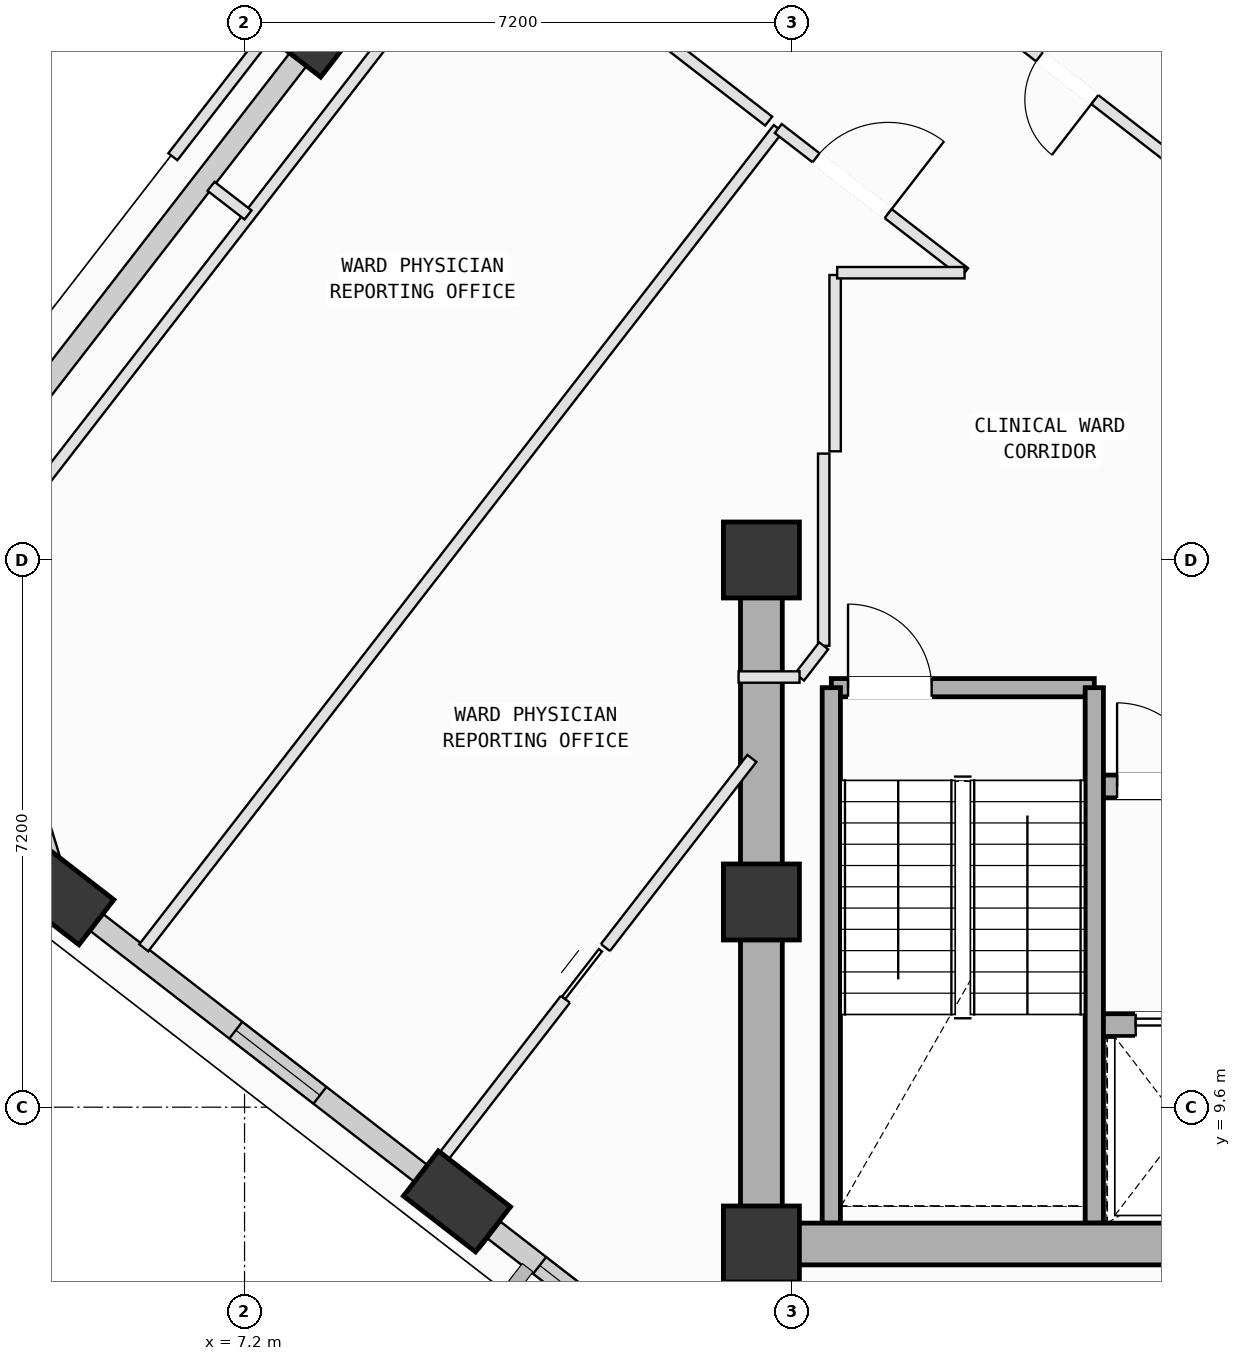
"""IFC4 building model, lengths in metres.
Left out: names, types, materials, properties, quantities, classifications, styles, units other than length and angle.
Written with IfcOpenShell. Run it as: python <this file> out.ifc"""

import sys

from ifc_helpers import new_model, si_unit, direction, frame, frame_2d, origin, origin_2d, place, context, subcontext, project, spatial, rectangle, extrude, element, fill, save


model = new_model("IFC4")
c1 = context("Model", 3, precision=1e-05, world=origin(), true_north=direction((0.0, 1.0)))
c2 = subcontext(c1, "Body", "Model", "MODEL_VIEW")
j1 = project(units=[si_unit("LENGTHUNIT", "METRE"), si_unit("PLANEANGLEUNIT", "RADIAN")], contexts=[c1])
p1 = place(None, origin())
s1 = spatial("IfcSite", under=j1, at=p1, CompositionType="ELEMENT")
p2 = place(p1, origin())
s2 = spatial("IfcBuilding", under=s1, at=p2, CompositionType="ELEMENT")
p3 = place(p2, frame((0.0, 0.0, 247.2)))
s3 = spatial("IfcBuildingStorey", under=s2, at=p3, CompositionType="ELEMENT", Elevation=247.2)
for number, where, z_axis, x_axis in (
    (1, (14.0, 7.8, 0.0), (0.0, 0.0, 1.0), (1.0, 0.0, 0.0)),
    (2, (14.0, 12.3, 0.0), (0.0, 0.0, 1.0), (1.0, 0.0, 0.0)),
    (3, (14.0, 16.8, 0.0), (0.0, 0.0, 1.0), (1.0, 0.0, 0.0)),
):
    element("IfcColumn", number, at=place(p3, frame(where, z_axis=z_axis, x_axis=x_axis)), inside=s3, PredefinedType="COLUMN", context=c2, shape_type="SweptSolid", body=[
        extrude(rectangle(XDim=1.0, YDim=1.0, at=origin_2d()), origin(), (0.0, 0.0, 1.0), 4.0),
    ])
p4 = place(p3, frame((8.272, 23.859, 0.002), z_axis=(0.00479977683, -0.104379956889, 0.994525910543), x_axis=(0.575449404971, 0.813653503986, 0.082619354686)))
e4 = element("IfcColumn", 4, at=p4, inside=s3, PredefinedType="COLUMN", context=c2, shape_type="SweptSolid", body=[
    extrude(rectangle(XDim=1.2, YDim=0.75, at=origin_2d()), origin(), (0.0, 0.0, 1.0), 4.018),
])
p5 = place(p3, frame((4.776, 12.401, 0.002), z_axis=(0.051917734031, -0.11807195289, 0.991646894229), x_axis=(-0.96817687498, 0.237482706263, 0.078965201073)))
e5 = element("IfcColumn", 5, at=p5, inside=s3, PredefinedType="COLUMN", context=c2, shape_type="SweptSolid", body=[
    extrude(rectangle(XDim=1.2, YDim=0.75, at=origin_2d()), origin(), (0.0, 0.0, 1.0), 4.03),
])
p6 = place(p3, frame((9.995, 8.36, 0.002), z_axis=(0.068486749732, -0.096572989879, 0.992966878973), x_axis=(-0.996627035573, 0.038482771556, 0.072481916762)))
e6 = element("IfcColumn", 6, at=p6, inside=s3, PredefinedType="COLUMN", context=c2, shape_type="SweptSolid", body=[
    extrude(rectangle(XDim=1.2, YDim=0.75, at=origin_2d()), origin(), (0.0, 0.0, 1.0), 4.025),
])
p7 = place(p3, frame((3.364, 17.519, 0.0), z_axis=(0.0, 0.0, 1.0), x_axis=(0.612209375749, 0.790695693832, 0.0)))
e7 = element("IfcWall", 7, at=p7, inside=s3, PredefinedType="SOLIDWALL", context=c2, shape_type="SweptSolid", body=[
    extrude(rectangle(XDim=7.485, YDim=0.28, at=frame_2d((3.742, 0.0))), origin(), (0.0, 0.0, 1.0), 3.265),
])
p8 = place(p3, frame((4.736, 12.533, 0.0), z_axis=(0.0, 0.0, 1.0), x_axis=(-0.29287135158, 0.956151855839, 0.0)))
e8 = element("IfcWall", 8, at=p8, inside=s3, PredefinedType="SOLIDWALL", context=c2, shape_type="SweptSolid", body=[
    extrude(rectangle(XDim=4.408, YDim=0.28, at=frame_2d((2.204, 0.0))), origin(), (0.0, 0.0, 1.0), 3.265),
])
p9 = place(p3, frame((9.865, 8.461, 0.0), z_axis=(0.0, 0.0, 1.0), x_axis=(-0.790689704837, 0.612217110725, 0.0)))
e9 = element("IfcWall", 9, at=p9, inside=s3, PredefinedType="SOLIDWALL", context=c2, shape_type="SweptSolid", body=[
    extrude(rectangle(XDim=5.83, YDim=0.28, at=frame_2d((2.915, 0.0))), origin(), (0.0, 0.0, 1.0), 3.265),
])
p10 = place(p9, frame((2.117, 0.0, 0.75)))
e10 = element("IfcOpeningElement", 10, at=p10, cuts=e9, PredefinedType="OPENING", context=c2, shape_type="SweptSolid", body=[
    extrude(rectangle(XDim=1.4, YDim=1.85, at=frame_2d((0.7, 0.925))), frame((0.0, 0.15, 0.0), z_axis=(0.0, -1.0, 0.0), x_axis=(1.0, 0.0, 0.0)), (0.0, 0.0, 1.0), 0.3),
])
p11 = place(p3, frame((15.119, 4.393, 0.0), z_axis=(0.0, 0.0, 1.0), x_axis=(-0.790702891909, 0.612200079, 0.0)))
e11 = element("IfcWall", 11, at=p11, inside=s3, PredefinedType="SOLIDWALL", context=c2, shape_type="SweptSolid", body=[
    extrude(rectangle(XDim=5.861, YDim=0.28, at=frame_2d((2.93, 0.0))), origin(), (0.0, 0.0, 1.0), 3.265),
])
p12 = place(p11, frame((3.304, 0.0, 0.75)))
e12 = element("IfcOpeningElement", 12, at=p12, cuts=e11, PredefinedType="OPENING", context=c2, shape_type="SweptSolid", body=[
    extrude(rectangle(XDim=1.8, YDim=2.05, at=frame_2d((0.9, 1.025))), frame((0.0, 0.15, 0.0), z_axis=(0.0, -1.0, 0.0), x_axis=(1.0, 0.0, 0.0)), (0.0, 0.0, 1.0), 0.3),
])
p13 = place(p3, frame((14.92, 15.12, 0.0), z_axis=(0.0, 0.0, 1.0), x_axis=(1.0, 0.0, 0.0)))
e13 = element("IfcWall", 13, at=p13, inside=s3, PredefinedType="SOLIDWALL", context=c2, shape_type="SweptSolid", body=[
    extrude(rectangle(XDim=3.46, YDim=0.24, at=frame_2d((1.73, 0.0))), origin(), (0.0, 0.0, 1.0), 3.78),
])
p14 = place(p13, frame((0.22, 0.0, 0.0)))
e14 = element("IfcOpeningElement", 14, at=p14, cuts=e13, PredefinedType="OPENING", context=c2, shape_type="SweptSolid", body=[
    extrude(rectangle(XDim=1.1, YDim=2.15, at=frame_2d((0.55, 1.075))), frame((0.0, 0.13, 0.0), z_axis=(0.0, -1.0, 0.0), x_axis=(1.0, 0.0, 0.0)), (0.0, 0.0, 1.0), 0.26),
])
for number, where, z_axis, x_axis in (
    (15, (18.38, 15.12, 0.0), (0.0, 0.0, 1.0), (0.0, -1.0, 0.0)),
    (16, (14.92, 8.075, 0.0), (0.0, 0.0, 1.0), (0.0, 1.0, 0.0)),
):
    element("IfcWall", number, at=place(p3, frame(where, z_axis=z_axis, x_axis=x_axis)), inside=s3, PredefinedType="SOLIDWALL", context=c2, shape_type="SweptSolid", body=[
        extrude(rectangle(XDim=7.045, YDim=0.24, at=frame_2d((3.522, 0.0))), origin(), (0.0, 0.0, 1.0), 3.78),
    ])
p15 = place(p3, frame((14.0, 7.8, 0.0), z_axis=(0.0, 0.0, 1.0), x_axis=(1.0, 0.0, 0.0)))
e17 = element("IfcWall", 17, at=p15, inside=s3, PredefinedType="SHEAR", context=c2, shape_type="SweptSolid", body=[
    extrude(rectangle(XDim=10.8, YDim=0.55, at=frame_2d((5.4, 0.0))), origin(), (0.0, 0.0, 1.0), 3.78),
])
p16 = place(p3, frame((14.0, 16.8, 0.0), z_axis=(0.0, 0.0, 1.0), x_axis=(0.0, -1.0, 0.0)))
e18 = element("IfcWall", 18, at=p16, inside=s3, PredefinedType="SHEAR", context=c2, shape_type="SweptSolid", body=[
    extrude(rectangle(XDim=9.0, YDim=0.55, at=frame_2d((4.5, 0.0))), origin(), (0.0, 0.0, 1.0), 3.78),
])
p17 = place(p3, frame((18.5, 10.68, 0.0), z_axis=(0.0, 0.0, 1.0), x_axis=(1.0, 0.0, 0.0)))
e19 = element("IfcWall", 19, at=p17, inside=s3, PredefinedType="SOLIDWALL", context=c2, shape_type="SweptSolid", body=[
    extrude(rectangle(XDim=5.3, YDim=0.3, at=frame_2d((2.65, 0.0))), origin(), (0.0, 0.0, 1.0), 3.78),
])
p18 = place(p17, frame((4.22, 0.0, 0.0)))
e20 = element("IfcOpeningElement", 20, at=p18, cuts=e19, PredefinedType="OPENING", context=c2, shape_type="SweptSolid", body=[
    extrude(rectangle(XDim=0.86, YDim=2.06, at=frame_2d((0.43, 1.03))), frame((0.0, 0.16, 0.0), z_axis=(0.0, -1.0, 0.0), x_axis=(1.0, 0.0, 0.0)), (0.0, 0.0, 1.0), 0.32),
])
p19 = place(p17, frame((0.425, 0.0, 0.0)))
e21 = element("IfcOpeningElement", 21, at=p19, cuts=e19, PredefinedType="OPENING", context=c2, shape_type="SweptSolid", body=[
    extrude(rectangle(XDim=1.25, YDim=2.18, at=frame_2d((0.625, 1.09))), frame((0.0, 0.16, 0.0), z_axis=(0.0, -1.0, 0.0), x_axis=(1.0, 0.0, 0.0)), (0.0, 0.0, 1.0), 0.32),
])
p20 = place(p17, frame((2.525, 0.0, 0.0)))
e22 = element("IfcOpeningElement", 22, at=p20, cuts=e19, PredefinedType="OPENING", context=c2, shape_type="SweptSolid", body=[
    extrude(rectangle(XDim=1.25, YDim=2.18, at=frame_2d((0.625, 1.09))), frame((0.0, 0.16, 0.0), z_axis=(0.0, -1.0, 0.0), x_axis=(1.0, 0.0, 0.0)), (0.0, 0.0, 1.0), 0.32),
])
p21 = place(p3, frame((18.5, 13.82, 0.0), z_axis=(0.0, 0.0, 1.0), x_axis=(1.0, 0.0, 0.0)))
e23 = element("IfcWall", 23, at=p21, inside=s3, PredefinedType="SOLIDWALL", context=c2, shape_type="SweptSolid", body=[
    extrude(rectangle(XDim=5.3, YDim=0.3, at=frame_2d((2.65, 0.0))), origin(), (0.0, 0.0, 1.0), 3.78),
])
p22 = place(p21, frame((0.18, 0.0, 0.0)))
e24 = element("IfcOpeningElement", 24, at=p22, cuts=e23, PredefinedType="OPENING", context=c2, shape_type="SweptSolid", body=[
    extrude(rectangle(XDim=1.1, YDim=2.15, at=frame_2d((0.55, 1.075))), frame((0.0, 0.16, 0.0), z_axis=(0.0, -1.0, 0.0), x_axis=(1.0, 0.0, 0.0)), (0.0, 0.0, 1.0), 0.32),
])
p23 = place(p3, frame((18.467, 4.438, 0.0), z_axis=(0.0, 0.0, 1.0), x_axis=(0.612067264166, 0.79080570568, 0.0)))
e25 = element("IfcWall", 25, at=p23, inside=s3, PredefinedType="PARTITIONING", context=c2, shape_type="SweptSolid", body=[
    extrude(rectangle(XDim=4.091, YDim=0.15, at=frame_2d((2.045, 0.0))), origin(), (0.0, 0.0, 1.0), 3.78),
])
p24 = place(p3, frame((20.465, 7.673, 0.0), z_axis=(0.0, 0.0, 1.0), x_axis=(-0.612173192991, -0.790723707614, 0.0)))
e26 = element("IfcWall", 26, at=p24, inside=s3, PredefinedType="PARTITIONING", context=c2, shape_type="SweptSolid", body=[
    extrude(rectangle(XDim=3.876, YDim=0.15, at=frame_2d((1.938, 0.0))), origin(), (0.0, 0.0, 1.0), 3.78),
])
p25 = place(p3, frame((10.344, 7.8, 0.0), z_axis=(0.0, 0.0, 1.0), x_axis=(-0.790811380368, 0.612059932261, 0.0)))
e27 = element("IfcWall", 27, at=p25, inside=s3, PredefinedType="PARTITIONING", context=c2, shape_type="SweptSolid", body=[
    extrude(rectangle(XDim=0.783, YDim=0.15, at=frame_2d((0.391, 0.0))), origin(), (0.0, 0.0, 1.0), 3.265),
])
p26 = place(p3, frame((9.67, 8.758, 0.0), z_axis=(0.0, 0.0, 1.0), x_axis=(0.612219073781, 0.790688184874, 0.0)))
e28 = element("IfcWall", 28, at=p26, inside=s3, PredefinedType="PARTITIONING", context=c2, shape_type="SweptSolid", body=[
    extrude(rectangle(XDim=6.869, YDim=0.15, at=frame_2d((3.434, 0.0))), origin(), (0.0, 0.0, 1.0), 3.78),
])
p27 = place(p26, frame((2.861, 0.0, 0.0)))
e29 = element("IfcOpeningElement", 29, at=p27, cuts=e28, PredefinedType="OPENING", context=c2, shape_type="SweptSolid", body=[
    extrude(rectangle(XDim=0.86, YDim=2.06, at=frame_2d((0.43, 1.03))), frame((0.0, 0.085, 0.0), z_axis=(0.0, -1.0, 0.0), x_axis=(1.0, 0.0, 0.0)), (0.0, 0.0, 1.0), 0.17),
])
p28 = place(p3, frame((14.97, 20.55, 0.0), z_axis=(0.0, 0.0, 1.0), x_axis=(0.0, -1.0, 0.0)))
e30 = element("IfcWall", 30, at=p28, inside=s3, PredefinedType="PARTITIONING", context=c2, shape_type="SweptSolid", body=[
    extrude(rectangle(XDim=2.32, YDim=0.15, at=frame_2d((1.16, 0.0))), origin(), (0.0, 0.0, 1.0), 3.78),
])
p29 = place(p3, frame((14.82, 18.2, 0.0), z_axis=(0.0, 0.0, 1.0), x_axis=(0.0, -1.0, 0.0)))
e31 = element("IfcWall", 31, at=p29, inside=s3, PredefinedType="PARTITIONING", context=c2, shape_type="SweptSolid", body=[
    extrude(rectangle(XDim=2.529, YDim=0.15, at=frame_2d((1.265, 0.0))), origin(), (0.0, 0.0, 1.0), 3.78),
])
p30 = place(p3, frame((14.82, 15.671, 0.0), z_axis=(0.0, 0.0, 1.0), x_axis=(-0.612182668934, -0.790716371309, 0.0)))
e32 = element("IfcWall", 32, at=p30, inside=s3, PredefinedType="PARTITIONING", context=c2, shape_type="SweptSolid", body=[
    extrude(rectangle(XDim=0.52, YDim=0.15, at=frame_2d((0.26, 0.0))), origin(), (0.0, 0.0, 1.0), 3.78),
])
p31 = place(p3, frame((14.502, 15.26, 0.0), z_axis=(0.0, 0.0, 1.0), x_axis=(-1.0, 0.0, 0.0)))
e33 = element("IfcWall", 33, at=p31, inside=s3, PredefinedType="PARTITIONING", context=c2, shape_type="SweptSolid", body=[
    extrude(rectangle(XDim=0.802, YDim=0.15, at=frame_2d((0.401, 0.0))), origin(), (0.0, 0.0, 1.0), 3.78),
])
p32 = place(p3, frame((5.874, 11.697, 0.0), z_axis=(0.0, 0.0, 1.0), x_axis=(0.612268172049, 0.790650166316, 0.0)))
e34 = element("IfcWall", 34, at=p32, inside=s3, PredefinedType="PARTITIONING", context=c2, shape_type="SweptSolid", body=[
    extrude(rectangle(XDim=13.634, YDim=0.15, at=frame_2d((6.817, 0.0))), origin(), (0.0, 0.0, 1.0), 3.78),
])
p33 = place(p3, frame((14.222, 22.477, 0.0), z_axis=(0.0, 0.0, 1.0), x_axis=(0.790834390633, -0.612030200719, 0.0)))
e35 = element("IfcWall", 35, at=p33, inside=s3, PredefinedType="PARTITIONING", context=c2, shape_type="SweptSolid", body=[
    extrude(rectangle(XDim=3.099, YDim=0.15, at=frame_2d((1.55, 0.0))), origin(), (0.0, 0.0, 1.0), 3.78),
])
p34 = place(p33, frame((0.628, 0.0, 0.0)))
e36 = element("IfcOpeningElement", 36, at=p34, cuts=e35, PredefinedType="OPENING", context=c2, shape_type="SweptSolid", body=[
    extrude(rectangle(XDim=1.2, YDim=2.15, at=frame_2d((0.6, 1.075))), frame((0.0, 0.085, 0.0), z_axis=(0.0, -1.0, 0.0), x_axis=(1.0, 0.0, 0.0)), (0.0, 0.0, 1.0), 0.17),
])
p35 = place(p3, frame((16.673, 20.58, 0.0), z_axis=(0.0, 0.0, 1.0), x_axis=(-1.0, 0.0, 0.0)))
e37 = element("IfcWall", 37, at=p35, inside=s3, PredefinedType="PARTITIONING", context=c2, shape_type="SweptSolid", body=[
    extrude(rectangle(XDim=1.676, YDim=0.15, at=frame_2d((0.838, 0.0))), origin(), (0.0, 0.0, 1.0), 3.78),
])
p36 = place(p3, frame((3.608, 16.608, 0.0), z_axis=(0.0, 0.0, 1.0), x_axis=(0.612168330421, 0.790727472161, 0.0)))
e38 = element("IfcWall", 38, at=p36, inside=s3, PredefinedType="PARTITIONING", context=c2, shape_type="SweptSolid", body=[
    extrude(rectangle(XDim=11.139, YDim=0.15, at=frame_2d((5.57, 0.0))), origin(), (0.0, 0.0, 1.0), 3.265),
])
p37 = place(p3, frame((10.427, 25.416, 0.0), z_axis=(0.0, 0.0, 1.0), x_axis=(0.790662088337, -0.612252776283, 0.0)))
e39 = element("IfcWall", 39, at=p37, inside=s3, PredefinedType="PARTITIONING", context=c2, shape_type="SweptSolid", body=[
    extrude(rectangle(XDim=4.64, YDim=0.15, at=frame_2d((2.32, 0.0))), origin(), (0.0, 0.0, 1.0), 3.415),
])
p38 = place(p37, frame((1.72, 0.0, 0.0)))
e40 = element("IfcOpeningElement", 40, at=p38, cuts=e39, PredefinedType="OPENING", context=c2, shape_type="SweptSolid", body=[
    extrude(rectangle(XDim=1.2, YDim=2.15, at=frame_2d((0.6, 1.075))), frame((0.0, 0.085, 0.0), z_axis=(0.0, -1.0, 0.0), x_axis=(1.0, 0.0, 0.0)), (0.0, 0.0, 1.0), 0.17),
])
p39 = place(p3, frame((5.115, 11.848, 0.0), z_axis=(0.0, 0.0, 1.0), x_axis=(-0.790764891101, 0.612119993958, 0.0)))
e41 = element("IfcWall", 41, at=p39, inside=s3, PredefinedType="PARTITIONING", context=c2, shape_type="SweptSolid", body=[
    extrude(rectangle(XDim=2.407, YDim=0.15, at=frame_2d((1.203, 0.0))), origin(), (0.0, 0.0, 1.0), 3.265),
])
p40 = place(p3, frame((20.189, 21.462, 0.0), z_axis=(0.0, 0.0, 1.0), x_axis=(-0.790688923612, 0.612218119691, 0.0)))
e42 = element("IfcWall", 42, at=p40, inside=s3, PredefinedType="PARTITIONING", context=c2, shape_type="SweptSolid", body=[
    extrude(rectangle(XDim=5.48, YDim=0.15, at=frame_2d((2.74, 0.0))), origin(), (0.0, 0.0, 1.0), 3.415),
])
p41 = place(p40, frame((2.28, 0.0, 0.0)))
e43 = element("IfcOpeningElement", 43, at=p41, cuts=e42, PredefinedType="OPENING", context=c2, shape_type="SweptSolid", body=[
    extrude(rectangle(XDim=0.92, YDim=2.1, at=frame_2d((0.46, 1.05))), frame((0.0, 0.085, 0.0), z_axis=(0.0, -1.0, 0.0), x_axis=(1.0, 0.0, 0.0)), (0.0, 0.0, 1.0), 0.17),
])
p42 = place(p3, frame((7.246, 21.34, 0.0), z_axis=(0.0, 0.0, 1.0), x_axis=(-0.790822733383, 0.61204526333, 0.0)))
e44 = element("IfcWall", 44, at=p42, inside=s3, PredefinedType="PARTITIONING", context=c2, shape_type="SweptSolid", body=[
    extrude(rectangle(XDim=0.616, YDim=0.15, at=frame_2d((0.308, 0.0))), origin(), (0.0, 0.0, 1.0), 3.78),
])
p43 = place(p3, frame((6.257, 22.106, 0.0), z_axis=(0.0, 0.0, 1.0), x_axis=(0.612340459049, 0.790594183011, 0.0)))
e45 = element("IfcWall", 45, at=p43, inside=s3, PredefinedType="PARTITIONING", context=c2, shape_type="SweptSolid", body=[
    extrude(rectangle(XDim=5.74, YDim=0.15, at=frame_2d((2.87, 0.0))), origin(), (0.0, 0.0, 1.0), 3.78),
])
p44 = place(p10, origin())
e46 = element("IfcWindow", 46, at=p44, inside=s3, PartitioningType="SINGLE_PANEL", PredefinedType="WINDOW", context=c2, shape_type="SweptSolid", body=[
    extrude(rectangle(XDim=1.4, YDim=1.85, at=frame_2d((0.7, 0.925))), frame((0.0, 0.03, 0.0), z_axis=(0.0, -1.0, 0.0), x_axis=(1.0, 0.0, 0.0)), (0.0, 0.0, 1.0), 0.06),
])
fill(e10, e46)
p45 = place(p12, origin())
e47 = element("IfcWindow", 47, at=p45, inside=s3, PartitioningType="SINGLE_PANEL", PredefinedType="WINDOW", context=c2, shape_type="SweptSolid", body=[
    extrude(rectangle(XDim=1.8, YDim=2.05, at=frame_2d((0.9, 1.025))), frame((0.0, 0.03, 0.0), z_axis=(0.0, -1.0, 0.0), x_axis=(1.0, 0.0, 0.0)), (0.0, 0.0, 1.0), 0.06),
])
fill(e12, e47)
p46 = place(p14, origin())
e48 = element("IfcDoor", 48, at=p46, inside=s3, OperationType="SINGLE_SWING_LEFT", PredefinedType="DOOR", context=c2, shape_type="SweptSolid", body=[
    extrude(rectangle(XDim=1.1, YDim=2.15, at=frame_2d((0.55, 1.075))), frame((0.0, 0.025, 0.0), z_axis=(0.0, -1.0, 0.0), x_axis=(1.0, 0.0, 0.0)), (0.0, 0.0, 1.0), 0.05),
])
fill(e14, e48)
p47 = place(p22, origin())
e49 = element("IfcDoor", 49, at=p47, inside=s3, OperationType="SINGLE_SWING_LEFT", PredefinedType="DOOR", context=c2, shape_type="SweptSolid", body=[
    extrude(rectangle(XDim=1.1, YDim=2.15, at=frame_2d((0.55, 1.075))), frame((0.0, 0.025, 0.0), z_axis=(0.0, -1.0, 0.0), x_axis=(1.0, 0.0, 0.0)), (0.0, 0.0, 1.0), 0.05),
])
fill(e24, e49)
p48 = place(p19, origin())
e50 = element("IfcDoor", 50, at=p48, inside=s3, OperationType="DOUBLE_DOOR_SLIDING", PredefinedType="DOOR", context=c2, shape_type="SweptSolid", body=[
    extrude(rectangle(XDim=1.25, YDim=2.18, at=frame_2d((0.625, 1.09))), frame((0.0, 0.025, 0.0), z_axis=(0.0, -1.0, 0.0), x_axis=(1.0, 0.0, 0.0)), (0.0, 0.0, 1.0), 0.05),
])
fill(e21, e50)
p49 = place(p34, origin())
e51 = element("IfcDoor", 51, at=p49, inside=s3, OperationType="SINGLE_SWING_RIGHT", PredefinedType="DOOR", context=c2, shape_type="SweptSolid", body=[
    extrude(rectangle(XDim=1.2, YDim=2.15, at=frame_2d((0.6, 1.075))), frame((0.0, 0.025, 0.0), z_axis=(0.0, -1.0, 0.0), x_axis=(1.0, 0.0, 0.0)), (0.0, 0.0, 1.0), 0.05),
])
fill(e36, e51)
p50 = place(p41, origin())
e52 = element("IfcDoor", 52, at=p50, inside=s3, OperationType="SINGLE_SWING_LEFT", PredefinedType="DOOR", context=c2, shape_type="SweptSolid", body=[
    extrude(rectangle(XDim=0.92, YDim=2.1, at=frame_2d((0.46, 1.05))), frame((0.0, 0.025, 0.0), z_axis=(0.0, -1.0, 0.0), x_axis=(1.0, 0.0, 0.0)), (0.0, 0.0, 1.0), 0.05),
])
fill(e43, e52)
p51 = place(p27, origin())
e53 = element("IfcDoor", 53, at=p51, inside=s3, OperationType="SLIDING_TO_LEFT", PredefinedType="DOOR", context=c2, shape_type="SweptSolid", body=[
    extrude(rectangle(XDim=0.86, YDim=2.06, at=frame_2d((0.43, 1.03))), frame((0.0, 0.025, 0.0), z_axis=(0.0, -1.0, 0.0), x_axis=(1.0, 0.0, 0.0)), (0.0, 0.0, 1.0), 0.05),
])
fill(e29, e53)
save(model, sys.argv[1])
